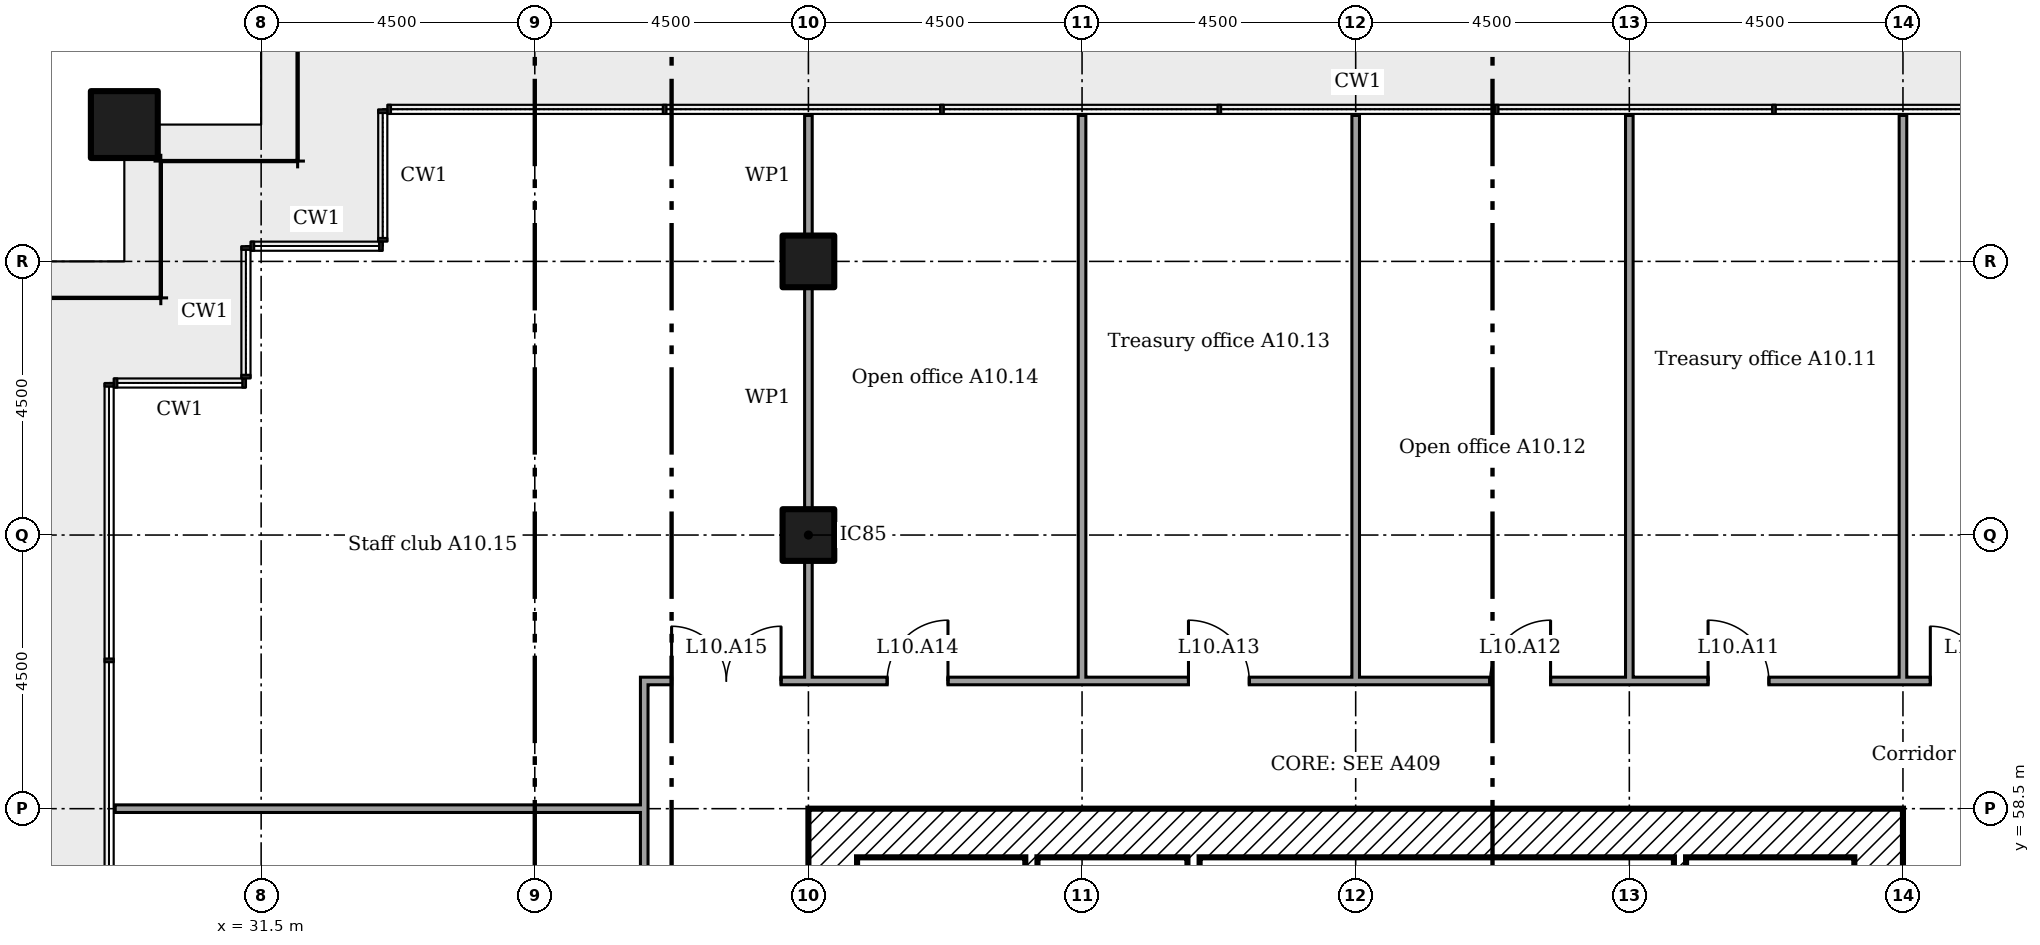
"""IFC4 building model, lengths in metres.
Left out: names, types, materials, properties, quantities, classifications, styles, units other than length and angle.
Written with IfcOpenShell. Run it as: python <this file> out.ifc"""

import sys

from ifc_helpers import new_model, si_unit, direction, frame, frame_2d, origin, origin_2d, place, context, subcontext, project, spatial, rectangle, extrude, element, fill, save


model = new_model("IFC4")
c1 = context("Model", 3, precision=1e-05, world=origin(), true_north=direction((0.0, 1.0)))
c2 = subcontext(c1, "Body", "Model", "MODEL_VIEW")
j1 = project(units=[si_unit("LENGTHUNIT", "METRE"), si_unit("PLANEANGLEUNIT", "RADIAN")], contexts=[c1])
p1 = place(None, origin())
s1 = spatial("IfcSite", under=j1, at=p1, CompositionType="ELEMENT")
p2 = place(p1, origin())
s2 = spatial("IfcBuilding", under=s1, at=p2, CompositionType="ELEMENT")
p3 = place(p2, frame((0.0, 0.0, 47.4)))
s3 = spatial("IfcBuildingStorey", under=s2, at=p3, CompositionType="ELEMENT", Elevation=47.4)
p4 = place(p3, frame((29.25, 69.75, 0.0)))
e1 = element("IfcColumn", 1, at=p4, inside=s3, PredefinedType="COLUMN", context=c2, shape_type="SweptSolid", body=[
    extrude(rectangle(XDim=1.1, YDim=1.1, at=origin_2d()), origin(), (0.0, 0.0, 1.0), 3.6),
])
for number, where in (
    (2, (40.5, 63.0, 0.0)),
    (3, (40.5, 67.5, 0.0)),
):
    element("IfcColumn", number, at=place(p3, frame(where)), inside=s3, PredefinedType="COLUMN", context=c2, shape_type="SweptSolid", body=[
        extrude(rectangle(XDim=0.85, YDim=0.85, at=origin_2d()), origin(), (0.0, 0.0, 1.0), 3.6),
    ])
p5 = place(p3, frame((58.1, 40.5, 0.0), z_axis=(0.0, 0.0, 1.0), x_axis=(0.0, 1.0, 0.0)))
e4 = element("IfcWall", 4, at=p5, inside=s3, PredefinedType="SHEAR", context=c2, shape_type="SweptSolid", body=[
    extrude(rectangle(XDim=18.0, YDim=0.8, at=frame_2d((9.0, 0.0))), origin(), (0.0, 0.0, 1.0), 3.35),
])
p6 = place(p5, frame((13.15, 0.0, 0.0)))
e5 = element("IfcOpeningElement", 5, at=p6, cuts=e4, PredefinedType="OPENING", context=c2, shape_type="SweptSolid", body=[
    extrude(rectangle(XDim=1.2, YDim=2.1, at=frame_2d((0.6, 1.05))), frame((0.0, 0.41, 0.0), z_axis=(0.0, -1.0, 0.0), x_axis=(1.0, 0.0, 0.0)), (0.0, 0.0, 1.0), 0.82),
])
p7 = place(p5, frame((3.9, 0.0, 0.0)))
e6 = element("IfcOpeningElement", 6, at=p7, cuts=e4, PredefinedType="OPENING", context=c2, shape_type="SweptSolid", body=[
    extrude(rectangle(XDim=1.8, YDim=2.1, at=frame_2d((0.9, 1.05))), frame((0.0, 0.41, 0.0), z_axis=(0.0, -1.0, 0.0), x_axis=(1.0, 0.0, 0.0)), (0.0, 0.0, 1.0), 0.82),
])
p8 = place(p5, frame((11.525, 0.0, 0.0)))
e7 = element("IfcOpeningElement", 7, at=p8, cuts=e4, PredefinedType="OPENING", context=c2, shape_type="SweptSolid", body=[
    extrude(rectangle(XDim=1.0, YDim=2.1, at=frame_2d((0.5, 1.05))), frame((0.0, 0.41, 0.0), z_axis=(0.0, -1.0, 0.0), x_axis=(1.0, 0.0, 0.0)), (0.0, 0.0, 1.0), 0.82),
])
p9 = place(p3, frame((41.3, 58.1, 0.0)))
e8 = element("IfcWall", 8, at=p9, inside=s3, PredefinedType="SHEAR", context=c2, shape_type="SweptSolid", body=[
    extrude(rectangle(XDim=16.4, YDim=0.8, at=frame_2d((8.2, 0.0))), origin(), (0.0, 0.0, 1.0), 3.35),
])
p10 = place(p3, frame((40.9, 40.5, 0.0), z_axis=(0.0, 0.0, 1.0), x_axis=(0.0, 1.0, 0.0)))
e9 = element("IfcWall", 9, at=p10, inside=s3, PredefinedType="SHEAR", context=c2, shape_type="SweptSolid", body=[
    extrude(rectangle(XDim=18.0, YDim=0.8, at=frame_2d((9.0, 0.0))), origin(), (0.0, 0.0, 1.0), 3.35),
])
p11 = place(p10, frame((3.65, 0.0, 0.0)))
e10 = element("IfcOpeningElement", 10, at=p11, cuts=e9, PredefinedType="OPENING", context=c2, shape_type="SweptSolid", body=[
    extrude(rectangle(XDim=1.2, YDim=2.1, at=frame_2d((0.6, 1.05))), frame((0.0, 0.41, 0.0), z_axis=(0.0, -1.0, 0.0), x_axis=(1.0, 0.0, 0.0)), (0.0, 0.0, 1.0), 0.82),
])
p12 = place(p10, frame((5.475, 0.0, 0.0)))
e11 = element("IfcOpeningElement", 11, at=p12, cuts=e9, PredefinedType="OPENING", context=c2, shape_type="SweptSolid", body=[
    extrude(rectangle(XDim=1.0, YDim=2.1, at=frame_2d((0.5, 1.05))), frame((0.0, 0.41, 0.0), z_axis=(0.0, -1.0, 0.0), x_axis=(1.0, 0.0, 0.0)), (0.0, 0.0, 1.0), 0.82),
])
p13 = place(p10, frame((12.3, 0.0, 0.0)))
e12 = element("IfcOpeningElement", 12, at=p13, cuts=e9, PredefinedType="OPENING", context=c2, shape_type="SweptSolid", body=[
    extrude(rectangle(XDim=1.0, YDim=2.1, at=frame_2d((0.5, 1.05))), frame((0.0, 0.41, 0.0), z_axis=(0.0, -1.0, 0.0), x_axis=(1.0, 0.0, 0.0)), (0.0, 0.0, 1.0), 0.82),
])
p14 = place(p3, frame((44.167, 57.7, 0.0), z_axis=(0.0, 0.0, 1.0), x_axis=(0.0, -1.0, 0.0)))
e13 = element("IfcWall", 13, at=p14, inside=s3, PredefinedType="SHEAR", context=c2, shape_type="SweptSolid", body=[
    extrude(rectangle(XDim=3.3, YDim=0.2, at=frame_2d((1.65, 0.0))), origin(), (0.0, 0.0, 1.0), 3.35),
])
p15 = place(p3, frame((46.833, 57.7, 0.0), z_axis=(0.0, 0.0, 1.0), x_axis=(0.0, -1.0, 0.0)))
e14 = element("IfcWall", 14, at=p15, inside=s3, PredefinedType="SHEAR", context=c2, shape_type="SweptSolid", body=[
    extrude(rectangle(XDim=4.4, YDim=0.2, at=frame_2d((2.2, 0.0))), origin(), (0.0, 0.0, 1.0), 3.35),
])
p16 = place(p3, frame((54.833, 57.7, 0.0), z_axis=(0.0, 0.0, 1.0), x_axis=(0.0, -1.0, 0.0)))
e15 = element("IfcWall", 15, at=p16, inside=s3, PredefinedType="SHEAR", context=c2, shape_type="SweptSolid", body=[
    extrude(rectangle(XDim=2.5, YDim=0.2, at=frame_2d((1.25, 0.0))), origin(), (0.0, 0.0, 1.0), 3.35),
])
p17 = place(p3, frame((29.1, 58.5, 0.0)))
e16 = element("IfcWall", 16, at=p17, inside=s3, PredefinedType="PARTITIONING", context=c2, shape_type="SweptSolid", body=[
    extrude(rectangle(XDim=8.7, YDim=0.125, at=frame_2d((4.35, 0.0))), origin(), (0.0, 0.0, 1.0), 2.766),
])
p18 = place(p3, frame((37.738, 60.6, 0.0)))
e17 = element("IfcWall", 17, at=p18, inside=s3, PredefinedType="PARTITIONING", context=c2, shape_type="SweptSolid", body=[
    extrude(rectangle(XDim=23.525, YDim=0.125, at=frame_2d((11.762, 0.0))), origin(), (0.0, 0.0, 1.0), 3.45),
])
p19 = place(p18, frame((21.212, 0.0, 0.0)))
e18 = element("IfcOpeningElement", 18, at=p19, cuts=e17, PredefinedType="OPENING", context=c2, shape_type="SweptSolid", body=[
    extrude(rectangle(XDim=1.8, YDim=2.1, at=frame_2d((0.9, 1.05))), frame((0.0, 0.073, 0.0), z_axis=(0.0, -1.0, 0.0), x_axis=(1.0, 0.0, 0.0)), (0.0, 0.0, 1.0), 0.145),
])
p20 = place(p18, frame((17.558, 0.0, 0.0)))
e19 = element("IfcOpeningElement", 19, at=p20, cuts=e17, PredefinedType="OPENING", context=c2, shape_type="SweptSolid", body=[
    extrude(rectangle(XDim=1.0, YDim=2.1, at=frame_2d((0.5, 1.05))), frame((0.0, 0.073, 0.0), z_axis=(0.0, -1.0, 0.0), x_axis=(1.0, 0.0, 0.0)), (0.0, 0.0, 1.0), 0.145),
])
p21 = place(p18, frame((13.968, 0.0, 0.0)))
e20 = element("IfcOpeningElement", 20, at=p21, cuts=e17, PredefinedType="OPENING", context=c2, shape_type="SweptSolid", body=[
    extrude(rectangle(XDim=1.0, YDim=2.1, at=frame_2d((0.5, 1.05))), frame((0.0, 0.073, 0.0), z_axis=(0.0, -1.0, 0.0), x_axis=(1.0, 0.0, 0.0)), (0.0, 0.0, 1.0), 0.145),
])
p22 = place(p18, frame((9.012, 0.0, 0.0)))
e21 = element("IfcOpeningElement", 21, at=p22, cuts=e17, PredefinedType="OPENING", context=c2, shape_type="SweptSolid", body=[
    extrude(rectangle(XDim=1.0, YDim=2.1, at=frame_2d((0.5, 1.05))), frame((0.0, 0.073, 0.0), z_axis=(0.0, -1.0, 0.0), x_axis=(1.0, 0.0, 0.0)), (0.0, 0.0, 1.0), 0.145),
])
p23 = place(p18, frame((4.058, 0.0, 0.0)))
e22 = element("IfcOpeningElement", 22, at=p23, cuts=e17, PredefinedType="OPENING", context=c2, shape_type="SweptSolid", body=[
    extrude(rectangle(XDim=1.0, YDim=2.1, at=frame_2d((0.5, 1.05))), frame((0.0, 0.073, 0.0), z_axis=(0.0, -1.0, 0.0), x_axis=(1.0, 0.0, 0.0)), (0.0, 0.0, 1.0), 0.145),
])
p24 = place(p18, frame((0.512, 0.0, 0.0)))
e23 = element("IfcOpeningElement", 23, at=p24, cuts=e17, PredefinedType="OPENING", context=c2, shape_type="SweptSolid", body=[
    extrude(rectangle(XDim=1.8, YDim=2.1, at=frame_2d((0.9, 1.05))), frame((0.0, 0.073, 0.0), z_axis=(0.0, -1.0, 0.0), x_axis=(1.0, 0.0, 0.0)), (0.0, 0.0, 1.0), 0.145),
])
p25 = place(p3, frame((37.8, 38.462, 0.0), z_axis=(0.0, 0.0, 1.0), x_axis=(0.0, 1.0, 0.0)))
e24 = element("IfcWall", 24, at=p25, inside=s3, PredefinedType="PARTITIONING", context=c2, shape_type="SweptSolid", body=[
    extrude(rectangle(XDim=22.075, YDim=0.125, at=frame_2d((11.038, 0.0))), origin(), (0.0, 0.0, 1.0), 3.45),
])
p26 = place(p25, frame((3.788, 0.0, 0.0)))
e25 = element("IfcOpeningElement", 25, at=p26, cuts=e24, PredefinedType="OPENING", context=c2, shape_type="SweptSolid", body=[
    extrude(rectangle(XDim=1.0, YDim=2.1, at=frame_2d((0.5, 1.05))), frame((0.0, 0.073, 0.0), z_axis=(0.0, -1.0, 0.0), x_axis=(1.0, 0.0, 0.0)), (0.0, 0.0, 1.0), 0.145),
])
p27 = place(p25, frame((17.288, 0.0, 0.0)))
e26 = element("IfcOpeningElement", 26, at=p27, cuts=e24, PredefinedType="OPENING", context=c2, shape_type="SweptSolid", body=[
    extrude(rectangle(XDim=1.0, YDim=2.1, at=frame_2d((0.5, 1.05))), frame((0.0, 0.073, 0.0), z_axis=(0.0, -1.0, 0.0), x_axis=(1.0, 0.0, 0.0)), (0.0, 0.0, 1.0), 0.145),
])
p28 = place(p25, frame((9.295, 0.0, 0.0)))
e27 = element("IfcOpeningElement", 27, at=p28, cuts=e24, PredefinedType="OPENING", context=c2, shape_type="SweptSolid", body=[
    extrude(rectangle(XDim=1.0, YDim=2.1, at=frame_2d((0.5, 1.05))), frame((0.0, 0.073, 0.0), z_axis=(0.0, -1.0, 0.0), x_axis=(1.0, 0.0, 0.0)), (0.0, 0.0, 1.0), 0.145),
])
p29 = place(p3, frame((40.5, 60.6, 0.0), z_axis=(0.0, 0.0, 1.0), x_axis=(0.0, 1.0, 0.0)))
e28 = element("IfcWall", 28, at=p29, inside=s3, PredefinedType="PARTITIONING", context=c2, shape_type="SweptSolid", body=[
    extrude(rectangle(XDim=1.975, YDim=0.125, at=frame_2d((0.987, 0.0))), origin(), (0.0, 0.0, 1.0), 2.676),
])
p30 = place(p3, frame((40.5, 63.425, 0.0), z_axis=(0.0, 0.0, 1.0), x_axis=(0.0, 1.0, 0.0)))
e29 = element("IfcWall", 29, at=p30, inside=s3, PredefinedType="PARTITIONING", context=c2, shape_type="SweptSolid", body=[
    extrude(rectangle(XDim=3.65, YDim=0.125, at=frame_2d((1.825, 0.0))), origin(), (0.0, 0.0, 1.0), 2.676),
])
p31 = place(p3, frame((40.5, 67.925, 0.0), z_axis=(0.0, 0.0, 1.0), x_axis=(0.0, 1.0, 0.0)))
e30 = element("IfcWall", 30, at=p31, inside=s3, PredefinedType="PARTITIONING", context=c2, shape_type="SweptSolid", body=[
    extrude(rectangle(XDim=1.975, YDim=0.125, at=frame_2d((0.987, 0.0))), origin(), (0.0, 0.0, 1.0), 2.676),
])
for number, where, z_axis, x_axis in (
    (31, (45.0, 60.6, 0.0), (0.0, 0.0, 1.0), (0.0, 1.0, 0.0)),
    (32, (49.5, 60.6, 0.0), (0.0, 0.0, 1.0), (0.0, 1.0, 0.0)),
    (33, (54.0, 60.6, 0.0), (0.0, 0.0, 1.0), (0.0, 1.0, 0.0)),
    (34, (58.5, 60.6, 0.0), (0.0, 0.0, 1.0), (0.0, 1.0, 0.0)),
):
    element("IfcWall", number, at=place(p3, frame(where, z_axis=z_axis, x_axis=x_axis)), inside=s3, PredefinedType="PARTITIONING", context=c2, shape_type="SweptSolid", body=[
        extrude(rectangle(XDim=9.3, YDim=0.125, at=frame_2d((4.65, 0.0))), origin(), (0.0, 0.0, 1.0), 2.766),
    ])
p32 = place(p19, origin())
e35 = element("IfcDoor", 35, at=p32, inside=s3, OperationType="DOUBLE_DOOR_SINGLE_SWING", PredefinedType="DOOR", context=c2, shape_type="SweptSolid", body=[
    extrude(rectangle(XDim=1.8, YDim=2.1, at=frame_2d((0.9, 1.05))), frame((0.0, 0.025, 0.0), z_axis=(0.0, -1.0, 0.0), x_axis=(1.0, 0.0, 0.0)), (0.0, 0.0, 1.0), 0.05),
])
fill(e18, e35)
p33 = place(p20, origin())
e36 = element("IfcDoor", 36, at=p33, inside=s3, OperationType="SINGLE_SWING_RIGHT", PredefinedType="DOOR", context=c2, shape_type="SweptSolid", body=[
    extrude(rectangle(XDim=1.0, YDim=2.1, at=frame_2d((0.5, 1.05))), frame((0.0, 0.025, 0.0), z_axis=(0.0, -1.0, 0.0), x_axis=(1.0, 0.0, 0.0)), (0.0, 0.0, 1.0), 0.05),
])
fill(e19, e36)
p34 = place(p21, origin())
e37 = element("IfcDoor", 37, at=p34, inside=s3, OperationType="SINGLE_SWING_LEFT", PredefinedType="DOOR", context=c2, shape_type="SweptSolid", body=[
    extrude(rectangle(XDim=1.0, YDim=2.1, at=frame_2d((0.5, 1.05))), frame((0.0, 0.025, 0.0), z_axis=(0.0, -1.0, 0.0), x_axis=(1.0, 0.0, 0.0)), (0.0, 0.0, 1.0), 0.05),
])
fill(e20, e37)
p35 = place(p22, origin())
e38 = element("IfcDoor", 38, at=p35, inside=s3, OperationType="SINGLE_SWING_RIGHT", PredefinedType="DOOR", context=c2, shape_type="SweptSolid", body=[
    extrude(rectangle(XDim=1.0, YDim=2.1, at=frame_2d((0.5, 1.05))), frame((0.0, 0.025, 0.0), z_axis=(0.0, -1.0, 0.0), x_axis=(1.0, 0.0, 0.0)), (0.0, 0.0, 1.0), 0.05),
])
fill(e21, e38)
p36 = place(p23, origin())
e39 = element("IfcDoor", 39, at=p36, inside=s3, OperationType="SINGLE_SWING_LEFT", PredefinedType="DOOR", context=c2, shape_type="SweptSolid", body=[
    extrude(rectangle(XDim=1.0, YDim=2.1, at=frame_2d((0.5, 1.05))), frame((0.0, 0.025, 0.0), z_axis=(0.0, -1.0, 0.0), x_axis=(1.0, 0.0, 0.0)), (0.0, 0.0, 1.0), 0.05),
])
fill(e22, e39)
p37 = place(p24, origin())
e40 = element("IfcDoor", 40, at=p37, inside=s3, OperationType="DOUBLE_DOOR_SINGLE_SWING", PredefinedType="DOOR", context=c2, shape_type="SweptSolid", body=[
    extrude(rectangle(XDim=1.8, YDim=2.1, at=frame_2d((0.9, 1.05))), frame((0.0, 0.025, 0.0), z_axis=(0.0, -1.0, 0.0), x_axis=(1.0, 0.0, 0.0)), (0.0, 0.0, 1.0), 0.05),
])
fill(e23, e40)
save(model, sys.argv[1])
